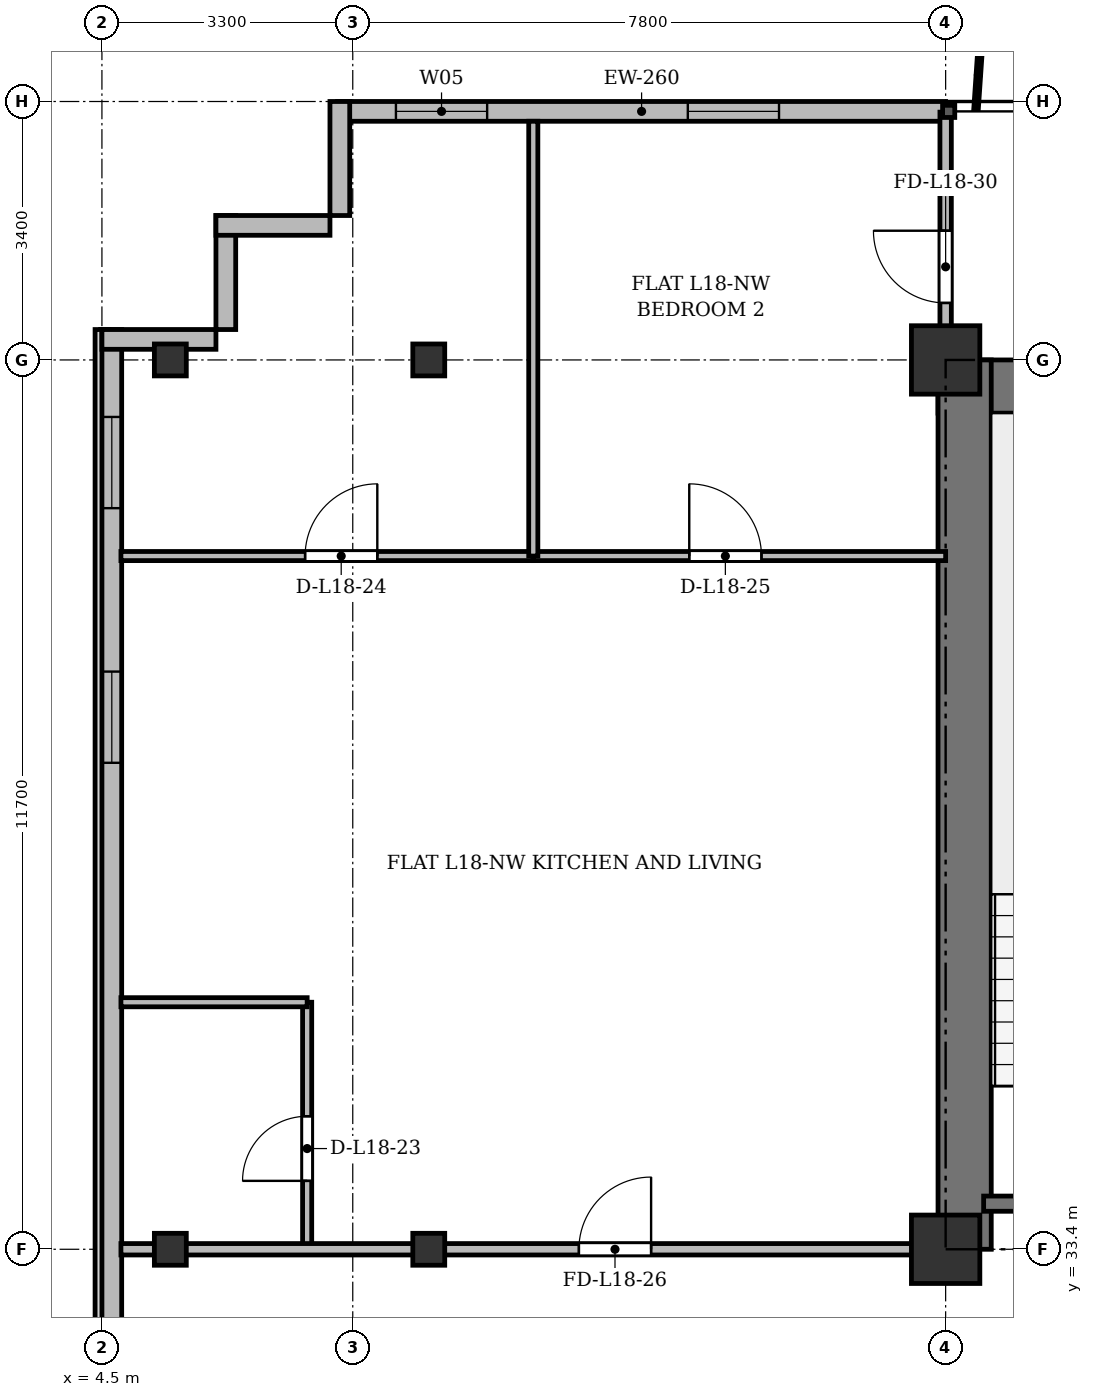
"""IFC4 building model, lengths in metres.
Left out: names, types, materials, properties, quantities, classifications, styles, units other than length and angle.
Written with IfcOpenShell. Run it as: python <this file> out.ifc"""

import sys

from ifc_helpers import new_model, si_unit, direction, frame, frame_2d, origin, origin_2d, place, context, subcontext, project, spatial, rectangle, i_section, extrude, source, transform, mapped, element, fill, save


model = new_model("IFC4")
c1 = context("Model", 3, precision=1e-05, world=origin(), true_north=direction((0.0, 1.0)))
c2 = subcontext(c1, "Body", "Model", "MODEL_VIEW")
j1 = project(units=[si_unit("LENGTHUNIT", "METRE"), si_unit("PLANEANGLEUNIT", "RADIAN")], contexts=[c1])
p1 = place(None, origin())
s1 = spatial("IfcSite", under=j1, at=p1, CompositionType="ELEMENT")
p2 = place(p1, origin())
s2 = spatial("IfcBuilding", under=s1, at=p2, CompositionType="ELEMENT")
p3 = place(p2, frame((0.0, 0.0, 70.3)))
s3 = spatial("IfcBuildingStorey", under=s2, at=p3, CompositionType="ELEMENT", Elevation=70.3)
m1 = source(origin(), c2, "Body", "SweptSolid", [
    extrude(i_section(OverallWidth=0.42, OverallDepth=0.42, WebThickness=0.026, FlangeThickness=0.04, at=origin_2d()), origin(), (0.0, 0.0, 1.0), 3.6),
])
for number, where, z_axis, x_axis in (
    (1, (5.4, 33.4, 0.0), (0.0, 0.0, 1.0), (1.0, 0.0, 0.0)),
    (2, (5.4, 45.1, 0.0), (0.0, 0.0, 1.0), (1.0, 0.0, 0.0)),
    (3, (8.8, 33.4, 0.0), (0.0, 0.0, 1.0), (1.0, 0.0, 0.0)),
    (4, (8.8, 45.1, 0.0), (0.0, 0.0, 1.0), (1.0, 0.0, 0.0)),
):
    element("IfcColumn", number, at=place(p3, frame(where, z_axis=z_axis, x_axis=x_axis)), inside=s3, PredefinedType="COLUMN", context=c2, shape_type="MappedRepresentation", body=[
        mapped(m1, transform((0.0, 0.0, 0.0), x_axis=(1.0, 0.0, 0.0), y_axis=(0.0, 1.0, 0.0), z_axis=(0.0, 0.0, 1.0), scale=1.0)),
    ])
m2 = source(origin(), c2, "Body", "SweptSolid", [
    extrude(rectangle(XDim=0.9, YDim=0.9, at=origin_2d()), origin(), (0.0, 0.0, 1.0), 3.6),
])
for number, where, z_axis, x_axis in (
    (5, (15.6, 33.4, 0.0), (0.0, 0.0, 1.0), (1.0, 0.0, 0.0)),
    (6, (15.6, 45.1, 0.0), (0.0, 0.0, 1.0), (1.0, 0.0, 0.0)),
):
    element("IfcColumn", number, at=place(p3, frame(where, z_axis=z_axis, x_axis=x_axis)), inside=s3, PredefinedType="COLUMN", context=c2, shape_type="MappedRepresentation", body=[
        mapped(m2, transform((0.0, 0.0, 0.0), x_axis=(1.0, 0.0, 0.0), y_axis=(0.0, 1.0, 0.0), z_axis=(0.0, 0.0, 1.0), scale=1.0)),
    ])
p4 = place(p3, frame((7.6, 48.37, 0.0), z_axis=(0.0, 0.0, 1.0), x_axis=(1.0, 0.0, 0.0)))
e7 = element("IfcWall", 7, at=p4, inside=s3, PredefinedType="SOLIDWALL", context=c2, shape_type="SweptSolid", body=[
    extrude(rectangle(XDim=8.0, YDim=0.26, at=frame_2d((4.0, 0.0))), origin(), (0.0, 0.0, 1.0), 3.22),
])
p5 = place(p4, frame((0.768, 0.0, 0.9)))
e8 = element("IfcOpeningElement", 8, at=p5, cuts=e7, PredefinedType="OPENING", context=c2, shape_type="SweptSolid", body=[
    extrude(rectangle(XDim=1.2, YDim=1.65, at=frame_2d((0.6, 0.825))), frame((0.0, 0.14, 0.0), z_axis=(0.0, -1.0, 0.0), x_axis=(1.0, 0.0, 0.0)), (0.0, 0.0, 1.0), 0.28),
])
p6 = place(p4, frame((4.608, 0.0, 0.9)))
e9 = element("IfcOpeningElement", 9, at=p6, cuts=e7, PredefinedType="OPENING", context=c2, shape_type="SweptSolid", body=[
    extrude(rectangle(XDim=1.2, YDim=1.65, at=frame_2d((0.6, 0.825))), frame((0.0, 0.14, 0.0), z_axis=(0.0, -1.0, 0.0), x_axis=(1.0, 0.0, 0.0)), (0.0, 0.0, 1.0), 0.28),
])
p7 = place(p3, frame((4.63, 5.9, 0.0), z_axis=(0.0, 0.0, 1.0), x_axis=(0.0, 1.0, 0.0)))
e10 = element("IfcWall", 10, at=p7, inside=s3, PredefinedType="SOLIDWALL", context=c2, shape_type="SweptSolid", body=[
    extrude(rectangle(XDim=39.6, YDim=0.26, at=frame_2d((19.8, 0.0))), origin(), (0.0, 0.0, 1.0), 3.22),
])
p8 = place(p7, frame((1.45, 0.0, 0.92)))
e11 = element("IfcOpeningElement", 11, at=p8, cuts=e10, PredefinedType="OPENING", context=c2, shape_type="SweptSolid", body=[
    extrude(rectangle(XDim=1.2, YDim=1.65, at=frame_2d((0.6, 0.825))), frame((0.0, 0.14, 0.0), z_axis=(0.0, -1.0, 0.0), x_axis=(1.0, 0.0, 0.0)), (0.0, 0.0, 1.0), 0.28),
])
p9 = place(p7, frame((4.2, 0.0, 0.92)))
e12 = element("IfcOpeningElement", 12, at=p9, cuts=e10, PredefinedType="OPENING", context=c2, shape_type="SweptSolid", body=[
    extrude(rectangle(XDim=2.6, YDim=1.9, at=frame_2d((1.3, 0.95))), frame((0.0, 0.14, 0.0), z_axis=(0.0, -1.0, 0.0), x_axis=(1.0, 0.0, 0.0)), (0.0, 0.0, 1.0), 0.28),
])
p10 = place(p7, frame((8.4, 0.0, 0.92)))
e13 = element("IfcOpeningElement", 13, at=p10, cuts=e10, PredefinedType="OPENING", context=c2, shape_type="SweptSolid", body=[
    extrude(rectangle(XDim=2.6, YDim=1.9, at=frame_2d((1.3, 0.95))), frame((0.0, 0.14, 0.0), z_axis=(0.0, -1.0, 0.0), x_axis=(1.0, 0.0, 0.0)), (0.0, 0.0, 1.0), 0.28),
])
p11 = place(p7, frame((33.9, 0.0, 0.92)))
e14 = element("IfcOpeningElement", 14, at=p11, cuts=e10, PredefinedType="OPENING", context=c2, shape_type="SweptSolid", body=[
    extrude(rectangle(XDim=1.2, YDim=1.65, at=frame_2d((0.6, 0.825))), frame((0.0, 0.14, 0.0), z_axis=(0.0, -1.0, 0.0), x_axis=(1.0, 0.0, 0.0)), (0.0, 0.0, 1.0), 0.28),
])
p12 = place(p7, frame((37.25, 0.0, 0.92)))
e15 = element("IfcOpeningElement", 15, at=p12, cuts=e10, PredefinedType="OPENING", context=c2, shape_type="SweptSolid", body=[
    extrude(rectangle(XDim=1.2, YDim=1.65, at=frame_2d((0.6, 0.825))), frame((0.0, 0.14, 0.0), z_axis=(0.0, -1.0, 0.0), x_axis=(1.0, 0.0, 0.0)), (0.0, 0.0, 1.0), 0.28),
])
p13 = place(p3, frame((4.5, 45.37, 0.0), z_axis=(0.0, 0.0, 1.0), x_axis=(1.0, 0.0, 0.0)))
e16 = element("IfcWall", 16, at=p13, inside=s3, PredefinedType="SOLIDWALL", context=c2, shape_type="SweptSolid", body=[
    extrude(rectangle(XDim=1.5, YDim=0.26, at=frame_2d((0.75, 0.0))), origin(), (0.0, 0.0, 1.0), 2.57),
])
for number, where, z_axis, x_axis in (
    (17, (6.13, 45.5, 0.0), (0.0, 0.0, 1.0), (0.0, 1.0, 0.0)),
    (18, (6.0, 46.87, 0.0), (0.0, 0.0, 1.0), (1.0, 0.0, 0.0)),
    (19, (7.63, 47.0, 0.0), (0.0, 0.0, 1.0), (0.0, 1.0, 0.0)),
):
    element("IfcWall", number, at=place(p3, frame(where, z_axis=z_axis, x_axis=x_axis)), inside=s3, PredefinedType="SOLIDWALL", context=c2, shape_type="SweptSolid", body=[
        extrude(rectangle(XDim=1.5, YDim=0.26, at=frame_2d((0.75, 0.0))), origin(), (0.0, 0.0, 1.0), 3.22),
    ])
p14 = place(p3, frame((15.5, 44.75, 0.0), z_axis=(0.0, 0.0, 1.0), x_axis=(1.0, 0.0, 0.0)))
e20 = element("IfcWall", 20, at=p14, inside=s3, PredefinedType="SHEAR", context=c2, shape_type="SweptSolid", body=[
    extrude(rectangle(XDim=43.4, YDim=0.7, at=frame_2d((21.7, 0.0))), origin(), (0.0, 0.0, 1.0), 3.22),
])
p15 = place(p3, frame((15.85, 33.4, 0.0), z_axis=(0.0, 0.0, 1.0), x_axis=(0.0, 1.0, 0.0)))
e21 = element("IfcWall", 21, at=p15, inside=s3, PredefinedType="SHEAR", context=c2, shape_type="SweptSolid", body=[
    extrude(rectangle(XDim=11.7, YDim=0.7, at=frame_2d((5.85, 0.0))), origin(), (0.0, 0.0, 1.0), 3.22),
])
p16 = place(p3, frame((16.1, 34.0, 0.0), z_axis=(0.0, 0.0, 1.0), x_axis=(1.0, 0.0, 0.0)))
e22 = element("IfcWall", 22, at=p16, inside=s3, PredefinedType="SHEAR", context=c2, shape_type="SweptSolid", body=[
    extrude(rectangle(XDim=3.4, YDim=0.2, at=frame_2d((1.7, 0.0))), origin(), (0.0, 0.0, 1.0), 3.22),
])
p17 = place(p3, frame((7.2, 33.4, 0.0), z_axis=(0.0, 0.0, 1.0), x_axis=(0.0, 1.0, 0.0)))
e23 = element("IfcWall", 23, at=p17, inside=s3, PredefinedType="PARTITIONING", context=c2, shape_type="SweptSolid", body=[
    extrude(rectangle(XDim=3.25, YDim=0.12, at=frame_2d((1.625, 0.0))), origin(), (0.0, 0.0, 1.0), 2.57),
])
p18 = place(p17, frame((0.9, 0.0, 0.0)))
e24 = element("IfcOpeningElement", 24, at=p18, cuts=e23, PredefinedType="OPENING", context=c2, shape_type="SweptSolid", body=[
    extrude(rectangle(XDim=0.85, YDim=2.1, at=frame_2d((0.425, 1.05))), frame((0.0, 0.07, 0.0), z_axis=(0.0, -1.0, 0.0), x_axis=(1.0, 0.0, 0.0)), (0.0, 0.0, 1.0), 0.14),
])
p19 = place(p3, frame((4.75, 36.65, 0.0), z_axis=(0.0, 0.0, 1.0), x_axis=(1.0, 0.0, 0.0)))
e25 = element("IfcWall", 25, at=p19, inside=s3, PredefinedType="PARTITIONING", context=c2, shape_type="SweptSolid", body=[
    extrude(rectangle(XDim=2.45, YDim=0.12, at=frame_2d((1.225, 0.0))), origin(), (0.0, 0.0, 1.0), 2.632),
])
p20 = place(p3, frame((4.75, 42.52, 0.0), z_axis=(0.0, 0.0, 1.0), x_axis=(1.0, 0.0, 0.0)))
e26 = element("IfcWall", 26, at=p20, inside=s3, PredefinedType="PARTITIONING", context=c2, shape_type="SweptSolid", body=[
    extrude(rectangle(XDim=5.425, YDim=0.12, at=frame_2d((2.712, 0.0))), origin(), (0.0, 0.0, 1.0), 2.632),
])
p21 = place(p20, frame((2.423, 0.0, 0.0)))
e27 = element("IfcOpeningElement", 27, at=p21, cuts=e26, PredefinedType="OPENING", context=c2, shape_type="SweptSolid", body=[
    extrude(rectangle(XDim=0.95, YDim=2.15, at=frame_2d((0.475, 1.075))), frame((0.0, 0.07, 0.0), z_axis=(0.0, -1.0, 0.0), x_axis=(1.0, 0.0, 0.0)), (0.0, 0.0, 1.0), 0.14),
])
p22 = place(p3, frame((10.175, 42.52, 0.0), z_axis=(0.0, 0.0, 1.0), x_axis=(1.0, 0.0, 0.0)))
e28 = element("IfcWall", 28, at=p22, inside=s3, PredefinedType="PARTITIONING", context=c2, shape_type="SweptSolid", body=[
    extrude(rectangle(XDim=5.425, YDim=0.12, at=frame_2d((2.712, 0.0))), origin(), (0.0, 0.0, 1.0), 2.632),
])
p23 = place(p22, frame((2.052, 0.0, 0.0)))
e29 = element("IfcOpeningElement", 29, at=p23, cuts=e28, PredefinedType="OPENING", context=c2, shape_type="SweptSolid", body=[
    extrude(rectangle(XDim=0.95, YDim=2.15, at=frame_2d((0.475, 1.075))), frame((0.0, 0.07, 0.0), z_axis=(0.0, -1.0, 0.0), x_axis=(1.0, 0.0, 0.0)), (0.0, 0.0, 1.0), 0.14),
])
p24 = place(p3, frame((10.175, 42.52, 0.0), z_axis=(0.0, 0.0, 1.0), x_axis=(0.0, 1.0, 0.0)))
e30 = element("IfcWall", 30, at=p24, inside=s3, PredefinedType="PARTITIONING", context=c2, shape_type="SweptSolid", body=[
    extrude(rectangle(XDim=5.72, YDim=0.12, at=frame_2d((2.86, 0.0))), origin(), (0.0, 0.0, 1.0), 2.57),
])
p25 = place(p3, frame((4.75, 33.4, 0.0), z_axis=(0.0, 0.0, 1.0), x_axis=(1.0, 0.0, 0.0)))
e31 = element("IfcWall", 31, at=p25, inside=s3, PredefinedType="PARTITIONING", context=c2, shape_type="SweptSolid", body=[
    extrude(rectangle(XDim=10.85, YDim=0.15, at=frame_2d((5.425, 0.0))), origin(), (0.0, 0.0, 1.0), 2.57),
])
p26 = place(p25, frame((6.025, 0.0, 0.0)))
e32 = element("IfcOpeningElement", 32, at=p26, cuts=e31, PredefinedType="OPENING", context=c2, shape_type="SweptSolid", body=[
    extrude(rectangle(XDim=0.95, YDim=2.15, at=frame_2d((0.475, 1.075))), frame((0.0, 0.085, 0.0), z_axis=(0.0, -1.0, 0.0), x_axis=(1.0, 0.0, 0.0)), (0.0, 0.0, 1.0), 0.17),
])
p27 = place(p3, frame((15.6, 44.75, 0.0), z_axis=(0.0, 0.0, 1.0), x_axis=(0.0, 1.0, 0.0)))
e33 = element("IfcWall", 33, at=p27, inside=s3, PredefinedType="PARTITIONING", context=c2, shape_type="SweptSolid", body=[
    extrude(rectangle(XDim=3.61, YDim=0.15, at=frame_2d((1.805, 0.0))), origin(), (0.0, 0.0, 1.0), 2.632),
])
p28 = place(p27, frame((1.1, 0.0, 0.0)))
e34 = element("IfcOpeningElement", 34, at=p28, cuts=e33, PredefinedType="OPENING", context=c2, shape_type="SweptSolid", body=[
    extrude(rectangle(XDim=0.95, YDim=2.15, at=frame_2d((0.475, 1.075))), frame((0.0, 0.085, 0.0), z_axis=(0.0, -1.0, 0.0), x_axis=(1.0, 0.0, 0.0)), (0.0, 0.0, 1.0), 0.17),
])
m3 = source(origin(), c2, "Body", "SweptSolid", [
    extrude(rectangle(XDim=1.2, YDim=1.65, at=frame_2d((0.6, 0.825))), frame((0.0, 0.03, 0.0), z_axis=(0.0, -1.0, 0.0), x_axis=(1.0, 0.0, 0.0)), (0.0, 0.0, 1.0), 0.06),
])
p29 = place(p5, origin())
e35 = element("IfcWindow", 35, at=p29, inside=s3, PartitioningType="SINGLE_PANEL", PredefinedType="WINDOW", context=c2, shape_type="MappedRepresentation", body=[
    mapped(m3, transform((0.0, 0.0, 0.0), x_axis=(1.0, 0.0, 0.0), y_axis=(0.0, 1.0, 0.0), z_axis=(0.0, 0.0, 1.0), scale=1.0)),
])
fill(e8, e35)
p30 = place(p6, origin())
e36 = element("IfcWindow", 36, at=p30, inside=s3, PartitioningType="SINGLE_PANEL", PredefinedType="WINDOW", context=c2, shape_type="MappedRepresentation", body=[
    mapped(m3, transform((0.0, 0.0, 0.0), x_axis=(1.0, 0.0, 0.0), y_axis=(0.0, 1.0, 0.0), z_axis=(0.0, 0.0, 1.0), scale=1.0)),
])
fill(e9, e36)
p31 = place(p11, origin())
e37 = element("IfcWindow", 37, at=p31, inside=s3, PartitioningType="SINGLE_PANEL", PredefinedType="WINDOW", context=c2, shape_type="MappedRepresentation", body=[
    mapped(m3, transform((0.0, 0.0, 0.0), x_axis=(1.0, 0.0, 0.0), y_axis=(0.0, 1.0, 0.0), z_axis=(0.0, 0.0, 1.0), scale=1.0)),
])
fill(e14, e37)
p32 = place(p12, origin())
e38 = element("IfcWindow", 38, at=p32, inside=s3, PartitioningType="SINGLE_PANEL", PredefinedType="WINDOW", context=c2, shape_type="MappedRepresentation", body=[
    mapped(m3, transform((0.0, 0.0, 0.0), x_axis=(1.0, 0.0, 0.0), y_axis=(0.0, 1.0, 0.0), z_axis=(0.0, 0.0, 1.0), scale=1.0)),
])
fill(e15, e38)
m4 = source(origin(), c2, "Body", "SweptSolid", [
    extrude(rectangle(XDim=0.85, YDim=2.1, at=frame_2d((0.425, 1.05))), frame((0.0, 0.025, 0.0), z_axis=(0.0, -1.0, 0.0), x_axis=(1.0, 0.0, 0.0)), (0.0, 0.0, 1.0), 0.05),
])
p33 = place(p18, origin())
e39 = element("IfcDoor", 39, at=p33, inside=s3, OperationType="SINGLE_SWING_LEFT", PredefinedType="DOOR", context=c2, shape_type="MappedRepresentation", body=[
    mapped(m4, transform((0.0, 0.0, 0.0), x_axis=(1.0, 0.0, 0.0), y_axis=(0.0, 1.0, 0.0), z_axis=(0.0, 0.0, 1.0), scale=1.0)),
])
fill(e24, e39)
m5 = source(origin(), c2, "Body", "SweptSolid", [
    extrude(rectangle(XDim=0.95, YDim=2.15, at=frame_2d((0.475, 1.075))), frame((0.0, 0.025, 0.0), z_axis=(0.0, -1.0, 0.0), x_axis=(1.0, 0.0, 0.0)), (0.0, 0.0, 1.0), 0.05),
])
p34 = place(p21, origin())
e40 = element("IfcDoor", 40, at=p34, inside=s3, OperationType="SINGLE_SWING_RIGHT", PredefinedType="DOOR", context=c2, shape_type="MappedRepresentation", body=[
    mapped(m5, transform((0.0, 0.0, 0.0), x_axis=(1.0, 0.0, 0.0), y_axis=(0.0, 1.0, 0.0), z_axis=(0.0, 0.0, 1.0), scale=1.0)),
])
fill(e27, e40)
p35 = place(p23, origin())
e41 = element("IfcDoor", 41, at=p35, inside=s3, OperationType="SINGLE_SWING_LEFT", PredefinedType="DOOR", context=c2, shape_type="MappedRepresentation", body=[
    mapped(m5, transform((0.0, 0.0, 0.0), x_axis=(1.0, 0.0, 0.0), y_axis=(0.0, 1.0, 0.0), z_axis=(0.0, 0.0, 1.0), scale=1.0)),
])
fill(e29, e41)
p36 = place(p26, origin())
e42 = element("IfcDoor", 42, at=p36, inside=s3, OperationType="SINGLE_SWING_RIGHT", PredefinedType="DOOR", context=c2, shape_type="MappedRepresentation", body=[
    mapped(m5, transform((0.0, 0.0, 0.0), x_axis=(1.0, 0.0, 0.0), y_axis=(0.0, 1.0, 0.0), z_axis=(0.0, 0.0, 1.0), scale=1.0)),
])
fill(e32, e42)
p37 = place(p28, origin())
e43 = element("IfcDoor", 43, at=p37, inside=s3, OperationType="SINGLE_SWING_RIGHT", PredefinedType="DOOR", context=c2, shape_type="MappedRepresentation", body=[
    mapped(m5, transform((0.0, 0.0, 0.0), x_axis=(1.0, 0.0, 0.0), y_axis=(0.0, 1.0, 0.0), z_axis=(0.0, 0.0, 1.0), scale=1.0)),
])
fill(e34, e43)
save(model, sys.argv[1])
